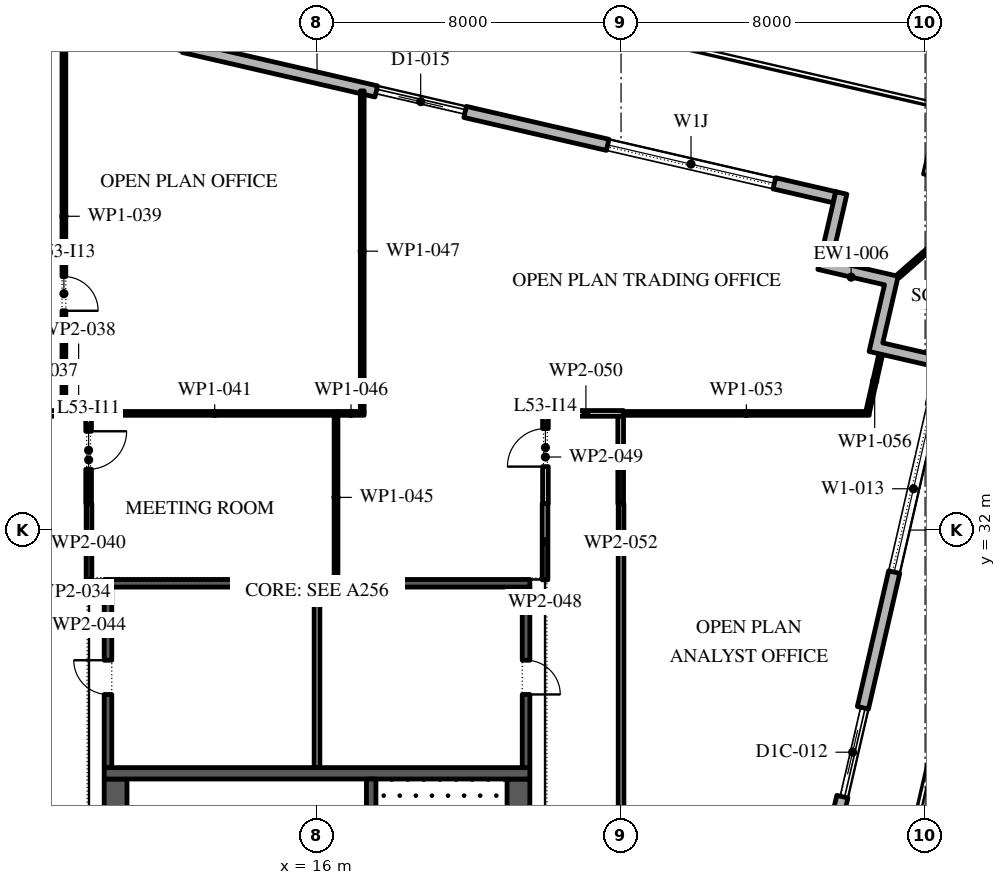
"""IFC4 building model, lengths in metres.
Left out: names, types, materials, properties, quantities, classifications, styles, units other than length and angle.
Written with IfcOpenShell. Run it as: python <this file> out.ifc"""

import sys

from ifc_helpers import new_model, si_unit, direction, frame, frame_2d, origin, place, context, subcontext, project, spatial, polyline, rectangle, outline, extrude, element, fill, save


model = new_model("IFC4")
c1 = context("Model", 3, precision=1e-05, world=origin(), true_north=direction((0.0, 1.0)))
c2 = subcontext(c1, "Body", "Model", "MODEL_VIEW")
j1 = project(units=[si_unit("LENGTHUNIT", "METRE"), si_unit("PLANEANGLEUNIT", "RADIAN")], contexts=[c1])
p1 = place(None, origin())
s1 = spatial("IfcSite", under=j1, at=p1, CompositionType="ELEMENT")
p2 = place(p1, origin())
s2 = spatial("IfcBuilding", under=s1, at=p2, CompositionType="ELEMENT")
p3 = place(p2, frame((0.0, 0.0, 247.2)))
s3 = spatial("IfcBuildingStorey", under=s2, at=p3, CompositionType="ELEMENT", Elevation=247.2)
p4 = place(p3, frame((21.359, -11.678, 0.0), z_axis=(0.0, 0.0, 1.0), x_axis=(0.224949198343, 0.974370493275, 0.0)))
e1 = element("IfcWall", 1, at=p4, inside=s3, PredefinedType="STANDARD", context=c2, shape_type="SweptSolid", body=[
    extrude(rectangle(XDim=49.5, YDim=0.3, at=frame_2d((24.75, 0.0))), origin(), (0.0, 0.0, 1.0), 4.0),
])
p5 = place(p4, frame((1.157, 0.0, 0.45)))
e2 = element("IfcOpeningElement", 2, at=p5, cuts=e1, PredefinedType="OPENING", context=c2, shape_type="SweptSolid", body=[
    extrude(rectangle(XDim=4.5, YDim=3.05, at=frame_2d((2.25, 1.525))), frame((0.0, 0.16, 0.0), z_axis=(0.0, -1.0, 0.0), x_axis=(1.0, 0.0, 0.0)), (0.0, 0.0, 1.0), 0.32),
])
p6 = place(p4, frame((8.121, 0.0, 0.45)))
e3 = element("IfcOpeningElement", 3, at=p6, cuts=e1, PredefinedType="OPENING", context=c2, shape_type="SweptSolid", body=[
    extrude(rectangle(XDim=4.5, YDim=3.05, at=frame_2d((2.25, 1.525))), frame((0.0, 0.16, 0.0), z_axis=(0.0, -1.0, 0.0), x_axis=(1.0, 0.0, 0.0)), (0.0, 0.0, 1.0), 0.32),
])
p7 = place(p4, frame((15.236, 0.0, 0.45)))
e4 = element("IfcOpeningElement", 4, at=p7, cuts=e1, PredefinedType="OPENING", context=c2, shape_type="SweptSolid", body=[
    extrude(rectangle(XDim=4.5, YDim=3.05, at=frame_2d((2.25, 1.525))), frame((0.0, 0.16, 0.0), z_axis=(0.0, -1.0, 0.0), x_axis=(1.0, 0.0, 0.0)), (0.0, 0.0, 1.0), 0.32),
])
p8 = place(p4, frame((22.35, 0.0, 0.45)))
e5 = element("IfcOpeningElement", 5, at=p8, cuts=e1, PredefinedType="OPENING", context=c2, shape_type="SweptSolid", body=[
    extrude(rectangle(XDim=4.5, YDim=3.05, at=frame_2d((2.25, 1.525))), frame((0.0, 0.16, 0.0), z_axis=(0.0, -1.0, 0.0), x_axis=(1.0, 0.0, 0.0)), (0.0, 0.0, 1.0), 0.32),
])
p9 = place(p4, frame((29.464, 0.0, 0.45)))
e6 = element("IfcOpeningElement", 6, at=p9, cuts=e1, PredefinedType="OPENING", context=c2, shape_type="SweptSolid", body=[
    extrude(rectangle(XDim=4.5, YDim=2.95, at=frame_2d((2.25, 1.475))), frame((0.0, 0.16, 0.0), z_axis=(0.0, -1.0, 0.0), x_axis=(1.0, 0.0, 0.0)), (0.0, 0.0, 1.0), 0.32),
])
p10 = place(p4, frame((37.628, 0.0, 0.0)))
e7 = element("IfcOpeningElement", 7, at=p10, cuts=e1, PredefinedType="OPENING", context=c2, shape_type="SweptSolid", body=[
    extrude(rectangle(XDim=2.4, YDim=3.325, at=frame_2d((1.2, 1.663))), frame((0.0, 0.16, 0.0), z_axis=(0.0, -1.0, 0.0), x_axis=(1.0, 0.0, 0.0)), (0.0, 0.0, 1.0), 0.32),
])
p11 = place(p4, frame((43.693, 0.0, 0.45)))
e8 = element("IfcOpeningElement", 8, at=p11, cuts=e1, PredefinedType="OPENING", context=c2, shape_type="SweptSolid", body=[
    extrude(rectangle(XDim=4.5, YDim=3.05, at=frame_2d((2.25, 1.525))), frame((0.0, 0.16, 0.0), z_axis=(0.0, -1.0, 0.0), x_axis=(1.0, 0.0, 0.0)), (0.0, 0.0, 1.0), 0.32),
])
p12 = place(p3, frame((29.616, 40.758, 0.0), z_axis=(0.0, 0.0, 1.0), x_axis=(-0.974370532314, 0.224949029246, 0.0)))
e9 = element("IfcWall", 9, at=p12, inside=s3, PredefinedType="STANDARD", context=c2, shape_type="SweptSolid", body=[
    extrude(rectangle(XDim=48.0, YDim=0.3, at=frame_2d((24.0, 0.0))), origin(), (0.0, 0.0, 1.0), 4.0),
])
p13 = place(p12, frame((1.625, 0.0, 0.45)))
e10 = element("IfcOpeningElement", 10, at=p13, cuts=e9, PredefinedType="OPENING", context=c2, shape_type="SweptSolid", body=[
    extrude(rectangle(XDim=4.5, YDim=2.675, at=frame_2d((2.25, 1.337))), frame((0.0, 0.16, 0.0), z_axis=(0.0, -1.0, 0.0), x_axis=(1.0, 0.0, 0.0)), (0.0, 0.0, 1.0), 0.32),
])
p14 = place(p12, frame((9.975, 0.0, 0.0)))
e11 = element("IfcOpeningElement", 11, at=p14, cuts=e9, PredefinedType="OPENING", context=c2, shape_type="SweptSolid", body=[
    extrude(rectangle(XDim=2.4, YDim=3.5, at=frame_2d((1.2, 1.75))), frame((0.0, 0.16, 0.0), z_axis=(0.0, -1.0, 0.0), x_axis=(1.0, 0.0, 0.0)), (0.0, 0.0, 1.0), 0.32),
])
p15 = place(p12, frame((17.575, 0.0, 0.45)))
e12 = element("IfcOpeningElement", 12, at=p15, cuts=e9, PredefinedType="OPENING", context=c2, shape_type="SweptSolid", body=[
    extrude(rectangle(XDim=4.5, YDim=2.525, at=frame_2d((2.25, 1.262))), frame((0.0, 0.16, 0.0), z_axis=(0.0, -1.0, 0.0), x_axis=(1.0, 0.0, 0.0)), (0.0, 0.0, 1.0), 0.32),
])
p16 = place(p12, frame((25.625, 0.0, 0.45)))
e13 = element("IfcOpeningElement", 13, at=p16, cuts=e9, PredefinedType="OPENING", context=c2, shape_type="SweptSolid", body=[
    extrude(rectangle(XDim=4.5, YDim=2.45, at=frame_2d((2.25, 1.225))), frame((0.0, 0.16, 0.0), z_axis=(0.0, -1.0, 0.0), x_axis=(1.0, 0.0, 0.0)), (0.0, 0.0, 1.0), 0.32),
])
p17 = place(p12, frame((33.675, 0.0, 0.45)))
e14 = element("IfcOpeningElement", 14, at=p17, cuts=e9, PredefinedType="OPENING", context=c2, shape_type="SweptSolid", body=[
    extrude(rectangle(XDim=4.5, YDim=2.45, at=frame_2d((2.25, 1.225))), frame((0.0, 0.16, 0.0), z_axis=(0.0, -1.0, 0.0), x_axis=(1.0, 0.0, 0.0)), (0.0, 0.0, 1.0), 0.32),
])
p18 = place(p12, frame((42.775, 0.0, 0.0)))
e15 = element("IfcOpeningElement", 15, at=p18, cuts=e9, PredefinedType="OPENING", context=c2, shape_type="SweptSolid", body=[
    extrude(rectangle(XDim=2.4, YDim=3.5, at=frame_2d((1.2, 1.75))), frame((0.0, 0.16, 0.0), z_axis=(0.0, -1.0, 0.0), x_axis=(1.0, 0.0, 0.0)), (0.0, 0.0, 1.0), 0.32),
])
p19 = place(p3, origin())
e16 = element("IfcWall", 16, at=p19, inside=s3, PredefinedType="STANDARD", context=c2, shape_type="SweptSolid", body=[
    extrude(outline(polyline([(30.931, 38.453), (29.177, 38.858), (29.65, 40.905), (29.942, 40.837), (29.537, 39.083), (31.291, 38.678), (30.886, 36.924), (32.348, 36.587), (32.28, 36.295), (30.526, 36.699), (30.931, 38.453)])), origin(), (0.0, 0.0, 1.0), 4.0),
])
p20 = place(p3, frame((31.291, 38.678, -0.05), z_axis=(0.0, 0.0, 1.0), x_axis=(0.752462268259, 0.658635358029, 0.0)))
e17 = element("IfcWall", 17, at=p20, inside=s3, PredefinedType="STANDARD", context=c2, shape_type="SweptSolid", body=[
    extrude(rectangle(XDim=3.305, YDim=0.1, at=frame_2d((1.652, 0.0))), origin(), (0.0, 0.0, 1.0), 4.05),
])
p21 = place(p3, frame((21.3, -2.45, 0.0), z_axis=(0.0, 0.0, 1.0), x_axis=(0.0, 1.0, 0.0)))
e18 = element("IfcWall", 18, at=p21, inside=s3, PredefinedType="SHEAR", context=c2, shape_type="SweptSolid", body=[
    extrude(rectangle(XDim=27.9, YDim=0.6, at=frame_2d((13.95, 0.0))), origin(), (0.0, 0.0, 1.0), 4.0),
])
p22 = place(p21, frame((5.05, 0.0, 0.0)))
e19 = element("IfcOpeningElement", 19, at=p22, cuts=e18, PredefinedType="OPENING", context=c2, shape_type="SweptSolid", body=[
    extrude(rectangle(XDim=1.2, YDim=2.1, at=frame_2d((0.6, 1.05))), frame((0.0, 0.31, 0.0), z_axis=(0.0, -1.0, 0.0), x_axis=(1.0, 0.0, 0.0)), (0.0, 0.0, 1.0), 0.62),
])
p23 = place(p21, frame((21.65, 0.0, 0.0)))
e20 = element("IfcOpeningElement", 20, at=p23, cuts=e18, PredefinedType="OPENING", context=c2, shape_type="SweptSolid", body=[
    extrude(rectangle(XDim=1.2, YDim=2.1, at=frame_2d((0.6, 1.05))), frame((0.0, 0.31, 0.0), z_axis=(0.0, -1.0, 0.0), x_axis=(1.0, 0.0, 0.0)), (0.0, 0.0, 1.0), 0.62),
])
p24 = place(p3, frame((10.7, -2.45, 0.0), z_axis=(0.0, 0.0, 1.0), x_axis=(0.0, 1.0, 0.0)))
e21 = element("IfcWall", 21, at=p24, inside=s3, PredefinedType="SHEAR", context=c2, shape_type="SweptSolid", body=[
    extrude(rectangle(XDim=27.9, YDim=0.6, at=frame_2d((13.95, 0.0))), origin(), (0.0, 0.0, 1.0), 4.0),
])
p25 = place(p24, frame((23.65, 0.0, 0.0)))
e22 = element("IfcOpeningElement", 22, at=p25, cuts=e21, PredefinedType="OPENING", context=c2, shape_type="SweptSolid", body=[
    extrude(rectangle(XDim=2.4, YDim=2.1, at=frame_2d((1.2, 1.05))), frame((0.0, 0.31, 0.0), z_axis=(0.0, -1.0, 0.0), x_axis=(1.0, 0.0, 0.0)), (0.0, 0.0, 1.0), 0.62),
])
p26 = place(p24, frame((1.087, 0.0, 0.0)))
e23 = element("IfcOpeningElement", 23, at=p26, cuts=e21, PredefinedType="OPENING", context=c2, shape_type="SweptSolid", body=[
    extrude(rectangle(XDim=0.9, YDim=2.1, at=frame_2d((0.45, 1.05))), frame((0.0, 0.31, 0.0), z_axis=(0.0, -1.0, 0.0), x_axis=(1.0, 0.0, 0.0)), (0.0, 0.0, 1.0), 0.62),
])
p27 = place(p24, frame((4.262, 0.0, 0.0)))
e24 = element("IfcOpeningElement", 24, at=p27, cuts=e21, PredefinedType="OPENING", context=c2, shape_type="SweptSolid", body=[
    extrude(rectangle(XDim=1.0, YDim=2.1, at=frame_2d((0.5, 1.05))), frame((0.0, 0.31, 0.0), z_axis=(0.0, -1.0, 0.0), x_axis=(1.0, 0.0, 0.0)), (0.0, 0.0, 1.0), 0.62),
])
p28 = place(p3, frame((10.4, 25.6, 0.0), z_axis=(0.0, 0.0, 1.0), x_axis=(1.0, 0.0, 0.0)))
e25 = element("IfcWall", 25, at=p28, inside=s3, PredefinedType="SHEAR", context=c2, shape_type="SweptSolid", body=[
    extrude(rectangle(XDim=11.2, YDim=0.3, at=frame_2d((5.6, 0.0))), origin(), (0.0, 0.0, 1.0), 4.0),
])
p29 = place(p3, frame((17.425, 19.15, 0.0), z_axis=(0.0, 0.0, 1.0), x_axis=(0.0, 1.0, 0.0)))
e26 = element("IfcWall", 26, at=p29, inside=s3, PredefinedType="SHEAR", context=c2, shape_type="SweptSolid", body=[
    extrude(rectangle(XDim=6.3, YDim=0.25, at=frame_2d((3.15, 0.0))), origin(), (0.0, 0.0, 1.0), 4.0),
])
p30 = place(p29, frame((0.05, 0.0, 0.0)))
e27 = element("IfcOpeningElement", 27, at=p30, cuts=e26, PredefinedType="OPENING", context=c2, shape_type="SweptSolid", body=[
    extrude(rectangle(XDim=1.2, YDim=2.1, at=frame_2d((0.6, 1.05))), frame((0.0, 0.135, 0.0), z_axis=(0.0, -1.0, 0.0), x_axis=(1.0, 0.0, 0.0)), (0.0, 0.0, 1.0), 0.27),
])
p31 = place(p3, frame((21.5, 25.75, 0.0), z_axis=(0.0, 0.0, 1.0), x_axis=(0.0, 1.0, 0.0)))
e28 = element("IfcWall", 28, at=p31, inside=s3, PredefinedType="SHEAR", context=c2, shape_type="SweptSolid", body=[
    extrude(rectangle(XDim=4.75, YDim=0.2, at=frame_2d((2.375, 0.0))), origin(), (0.0, 0.0, 1.0), 4.0),
])
p32 = place(p31, frame((1.925, 0.0, 0.0)))
e29 = element("IfcOpeningElement", 29, at=p32, cuts=e28, PredefinedType="OPENING", context=c2, shape_type="SweptSolid", body=[
    extrude(rectangle(XDim=0.9, YDim=2.1, at=frame_2d((0.45, 1.05))), frame((0.0, 0.11, 0.0), z_axis=(0.0, -1.0, 0.0), x_axis=(1.0, 0.0, 0.0)), (0.0, 0.0, 1.0), 0.22),
])
p33 = place(p3, frame((10.5, 25.75, 0.0), z_axis=(0.0, 0.0, 1.0), x_axis=(0.0, 1.0, 0.0)))
e30 = element("IfcWall", 30, at=p33, inside=s3, PredefinedType="SHEAR", context=c2, shape_type="SweptSolid", body=[
    extrude(rectangle(XDim=4.75, YDim=0.2, at=frame_2d((2.375, 0.0))), origin(), (0.0, 0.0, 1.0), 4.0),
])
p34 = place(p33, frame((1.925, 0.0, 0.0)))
e31 = element("IfcOpeningElement", 31, at=p34, cuts=e30, PredefinedType="OPENING", context=c2, shape_type="SweptSolid", body=[
    extrude(rectangle(XDim=0.9, YDim=2.1, at=frame_2d((0.45, 1.05))), frame((0.0, 0.11, 0.0), z_axis=(0.0, -1.0, 0.0), x_axis=(1.0, 0.0, 0.0)), (0.0, 0.0, 1.0), 0.22),
])
p35 = place(p3, frame((10.4, 30.6, 0.0), z_axis=(0.0, 0.0, 1.0), x_axis=(1.0, 0.0, 0.0)))
e32 = element("IfcWall", 32, at=p35, inside=s3, PredefinedType="SHEAR", context=c2, shape_type="SweptSolid", body=[
    extrude(rectangle(XDim=11.2, YDim=0.2, at=frame_2d((5.6, 0.0))), origin(), (0.0, 0.0, 1.0), 4.0),
])
p36 = place(p3, frame((16.0, 25.75, 0.0), z_axis=(0.0, 0.0, 1.0), x_axis=(0.0, 1.0, 0.0)))
e33 = element("IfcWall", 33, at=p36, inside=s3, PredefinedType="PARTITIONING", context=c2, shape_type="SweptSolid", body=[
    extrude(rectangle(XDim=4.75, YDim=0.15, at=frame_2d((2.375, 0.0))), origin(), (0.0, 0.0, 1.0), 4.0),
])
p37 = place(p3, frame((8.085, 35.07, 0.0), z_axis=(0.0, 0.0, 1.0), x_axis=(1.0, 0.0, 0.0)))
e34 = element("IfcWall", 34, at=p37, inside=s3, PredefinedType="PARTITIONING", context=c2, shape_type="SweptSolid", body=[
    extrude(rectangle(XDim=1.305, YDim=0.15, at=frame_2d((0.652, 0.0))), origin(), (0.0, 0.0, 1.0), 4.0),
])
p38 = place(p3, frame((9.39, 35.07, 0.0), z_axis=(0.0, 0.0, 1.0), x_axis=(1.0, 0.0, 0.0)))
e35 = element("IfcWall", 35, at=p38, inside=s3, PredefinedType="PARTITIONING", context=c2, shape_type="SweptSolid", body=[
    extrude(rectangle(XDim=0.675, YDim=0.15, at=frame_2d((0.337, 0.0))), origin(), (0.0, 0.0, 1.0), 4.0),
])
p39 = place(p3, frame((9.34, 45.368, 0.0), z_axis=(0.0, 0.0, 1.0), x_axis=(0.0, -1.0, 0.0)))
e36 = element("IfcWall", 36, at=p39, inside=s3, PredefinedType="PARTITIONING", context=c2, shape_type="SweptSolid", body=[
    extrude(rectangle(XDim=10.223, YDim=0.1, at=frame_2d((5.111, 0.0))), origin(), (0.0, 0.0, 1.0), 4.0),
])
p40 = place(p39, frame((6.698, 0.0, 0.0)))
e37 = element("IfcOpeningElement", 37, at=p40, cuts=e36, PredefinedType="OPENING", context=c2, shape_type="SweptSolid", body=[
    extrude(rectangle(XDim=0.9, YDim=2.1, at=frame_2d((0.45, 1.05))), frame((0.0, 0.06, 0.0), z_axis=(0.0, -1.0, 0.0), x_axis=(1.0, 0.0, 0.0)), (0.0, 0.0, 1.0), 0.12),
])
p41 = place(p3, frame((9.99, 34.995, 0.0), z_axis=(0.0, 0.0, 1.0), x_axis=(0.0, -1.0, 0.0)))
e38 = element("IfcWall", 38, at=p41, inside=s3, PredefinedType="PARTITIONING", context=c2, shape_type="SweptSolid", body=[
    extrude(rectangle(XDim=2.295, YDim=0.15, at=frame_2d((1.147, 0.0))), origin(), (0.0, 0.0, 1.0), 4.0),
])
p42 = place(p41, frame((0.395, 0.0, 0.0)))
e39 = element("IfcOpeningElement", 39, at=p42, cuts=e38, PredefinedType="OPENING", context=c2, shape_type="SweptSolid", body=[
    extrude(rectangle(XDim=1.0, YDim=2.1, at=frame_2d((0.5, 1.05))), frame((0.0, 0.085, 0.0), z_axis=(0.0, -1.0, 0.0), x_axis=(1.0, 0.0, 0.0)), (0.0, 0.0, 1.0), 0.17),
])
p43 = place(p3, frame((10.065, 35.07, 0.0), z_axis=(0.0, 0.0, 1.0), x_axis=(1.0, 0.0, 0.0)))
e40 = element("IfcWall", 40, at=p43, inside=s3, PredefinedType="PARTITIONING", context=c2, shape_type="SweptSolid", body=[
    extrude(rectangle(XDim=6.485, YDim=0.1, at=frame_2d((3.243, 0.0))), origin(), (0.0, 0.0, 1.0), 4.0),
])
p44 = place(p3, frame((10.0, 32.7, 0.0), z_axis=(0.0, 0.0, 1.0), x_axis=(0.0, -1.0, 0.0)))
e41 = element("IfcWall", 41, at=p44, inside=s3, PredefinedType="PARTITIONING", context=c2, shape_type="SweptSolid", body=[
    extrude(rectangle(XDim=2.0, YDim=0.15, at=frame_2d((1.0, 0.0))), origin(), (0.0, 0.0, 1.0), 4.0),
])
p45 = place(p3, frame((16.5, 35.02, 0.0), z_axis=(0.0, 0.0, 1.0), x_axis=(0.0, -1.0, 0.0)))
e42 = element("IfcWall", 42, at=p45, inside=s3, PredefinedType="PARTITIONING", context=c2, shape_type="SweptSolid", body=[
    extrude(rectangle(XDim=4.32, YDim=0.1, at=frame_2d((2.16, 0.0))), origin(), (0.0, 0.0, 1.0), 4.0),
])
p46 = place(p3, frame((17.24, 35.07, 0.0), z_axis=(0.0, 0.0, 1.0), x_axis=(-1.0, 0.0, 0.0)))
e43 = element("IfcWall", 43, at=p46, inside=s3, PredefinedType="PARTITIONING", context=c2, shape_type="SweptSolid", body=[
    extrude(rectangle(XDim=0.69, YDim=0.1, at=frame_2d((0.345, 0.0))), origin(), (0.0, 0.0, 1.0), 4.0),
])
p47 = place(p3, frame((17.19, 43.556, 0.0), z_axis=(0.0, 0.0, 1.0), x_axis=(0.0, -1.0, 0.0)))
e44 = element("IfcWall", 44, at=p47, inside=s3, PredefinedType="PARTITIONING", context=c2, shape_type="SweptSolid", body=[
    extrude(rectangle(XDim=8.436, YDim=0.1, at=frame_2d((4.218, 0.0))), origin(), (0.0, 0.0, 1.0), 4.0),
])
p48 = place(p3, frame((22.0, 30.69, 0.0), z_axis=(0.0, 0.0, 1.0), x_axis=(0.0, 1.0, 0.0)))
e45 = element("IfcWall", 45, at=p48, inside=s3, PredefinedType="PARTITIONING", context=c2, shape_type="SweptSolid", body=[
    extrude(rectangle(XDim=2.01, YDim=0.15, at=frame_2d((1.005, 0.0))), origin(), (0.0, 0.0, 1.0), 4.0),
])
p49 = place(p3, frame((22.01, 32.7, 0.0), z_axis=(0.0, 0.0, 1.0), x_axis=(0.0, 1.0, 0.0)))
e46 = element("IfcWall", 46, at=p49, inside=s3, PredefinedType="PARTITIONING", context=c2, shape_type="SweptSolid", body=[
    extrude(rectangle(XDim=2.445, YDim=0.15, at=frame_2d((1.223, 0.0))), origin(), (0.0, 0.0, 1.0), 4.0),
])
p50 = place(p49, frame((0.97, 0.0, 0.0)))
e47 = element("IfcOpeningElement", 47, at=p50, cuts=e46, PredefinedType="OPENING", context=c2, shape_type="SweptSolid", body=[
    extrude(rectangle(XDim=1.0, YDim=2.1, at=frame_2d((0.5, 1.05))), frame((0.0, 0.085, 0.0), z_axis=(0.0, -1.0, 0.0), x_axis=(1.0, 0.0, 0.0)), (0.0, 0.0, 1.0), 0.17),
])
p51 = place(p3, frame((22.085, 35.07, 0.0), z_axis=(0.0, 0.0, 1.0), x_axis=(1.0, 0.0, 0.0)))
e48 = element("IfcWall", 48, at=p51, inside=s3, PredefinedType="PARTITIONING", context=c2, shape_type="SweptSolid", body=[
    extrude(rectangle(XDim=1.98, YDim=0.15, at=frame_2d((0.99, 0.0))), origin(), (0.0, 0.0, 1.0), 4.0),
])
p52 = place(p3, frame((23.99, 34.995, 0.0), z_axis=(0.0, 0.0, 1.0), x_axis=(0.0, -1.0, 0.0)))
e49 = element("IfcWall", 49, at=p52, inside=s3, PredefinedType="PARTITIONING", context=c2, shape_type="SweptSolid", body=[
    extrude(rectangle(XDim=2.295, YDim=0.15, at=frame_2d((1.147, 0.0))), origin(), (0.0, 0.0, 1.0), 4.0),
])
p53 = place(p3, frame((24.065, 35.07, 0.0), z_axis=(0.0, 0.0, 1.0), x_axis=(1.0, 0.0, 0.0)))
e50 = element("IfcWall", 50, at=p53, inside=s3, PredefinedType="PARTITIONING", context=c2, shape_type="SweptSolid", body=[
    extrude(rectangle(XDim=6.465, YDim=0.1, at=frame_2d((3.232, 0.0))), origin(), (0.0, 0.0, 1.0), 4.0),
])
p54 = place(p3, frame((24.0, 32.7, 0.0), z_axis=(0.0, 0.0, 1.0), x_axis=(0.0, -1.0, 0.0)))
e51 = element("IfcWall", 51, at=p54, inside=s3, PredefinedType="PARTITIONING", context=c2, shape_type="SweptSolid", body=[
    extrude(rectangle(XDim=28.905, YDim=0.15, at=frame_2d((14.453, 0.0))), origin(), (0.0, 0.0, 1.0), 4.0),
])
p55 = place(p54, frame((19.83, 0.0, 0.0)))
e52 = element("IfcOpeningElement", 52, at=p55, cuts=e51, PredefinedType="OPENING", context=c2, shape_type="SweptSolid", body=[
    extrude(rectangle(XDim=1.0, YDim=2.1, at=frame_2d((0.5, 1.05))), frame((0.0, 0.085, 0.0), z_axis=(0.0, -1.0, 0.0), x_axis=(1.0, 0.0, 0.0)), (0.0, 0.0, 1.0), 0.17),
])
p56 = place(p3, frame((30.491, 35.119, 0.0), z_axis=(0.0, 0.0, 1.0), x_axis=(0.221461033886, 0.975169221453, 0.0)))
e53 = element("IfcWall", 53, at=p56, inside=s3, PredefinedType="PARTITIONING", context=c2, shape_type="SweptSolid", body=[
    extrude(rectangle(XDim=1.648, YDim=0.1, at=frame_2d((0.824, 0.0))), origin(), (0.0, 0.0, 1.0), 4.0),
])
p57 = place(p10, origin())
e54 = element("IfcDoor", 54, at=p57, inside=s3, OperationType="DOUBLE_DOOR_SLIDING", PredefinedType="DOOR", context=c2, shape_type="SweptSolid", body=[
    extrude(rectangle(XDim=2.4, YDim=3.325, at=frame_2d((1.2, 1.663))), frame((0.0, 0.025, 0.0), z_axis=(0.0, -1.0, 0.0), x_axis=(1.0, 0.0, 0.0)), (0.0, 0.0, 1.0), 0.05),
])
fill(e7, e54)
p58 = place(p11, origin())
e55 = element("IfcWindow", 55, at=p58, inside=s3, PartitioningType="DOUBLE_PANEL_VERTICAL", PredefinedType="WINDOW", context=c2, shape_type="SweptSolid", body=[
    extrude(rectangle(XDim=4.5, YDim=3.05, at=frame_2d((2.25, 1.525))), frame((0.0, 0.03, 0.0), z_axis=(0.0, -1.0, 0.0), x_axis=(1.0, 0.0, 0.0)), (0.0, 0.0, 1.0), 0.06),
])
fill(e8, e55)
p59 = place(p13, origin())
e56 = element("IfcWindow", 56, at=p59, inside=s3, PartitioningType="DOUBLE_PANEL_VERTICAL", PredefinedType="WINDOW", context=c2, shape_type="SweptSolid", body=[
    extrude(rectangle(XDim=4.5, YDim=2.675, at=frame_2d((2.25, 1.337))), frame((0.0, 0.03, 0.0), z_axis=(0.0, -1.0, 0.0), x_axis=(1.0, 0.0, 0.0)), (0.0, 0.0, 1.0), 0.06),
])
fill(e10, e56)
p60 = place(p14, origin())
e57 = element("IfcDoor", 57, at=p60, inside=s3, OperationType="DOUBLE_DOOR_SLIDING", PredefinedType="DOOR", context=c2, shape_type="SweptSolid", body=[
    extrude(rectangle(XDim=2.4, YDim=3.5, at=frame_2d((1.2, 1.75))), frame((0.0, 0.025, 0.0), z_axis=(0.0, -1.0, 0.0), x_axis=(1.0, 0.0, 0.0)), (0.0, 0.0, 1.0), 0.05),
])
fill(e11, e57)
p61 = place(p32, frame((0.9, 0.15, 0.0), z_axis=(0.0, 0.0, 1.0), x_axis=(-1.0, 0.0, 0.0)))
e58 = element("IfcDoor", 58, at=p61, inside=s3, OperationType="SINGLE_SWING_LEFT", PredefinedType="DOOR", context=c2, shape_type="SweptSolid", body=[
    extrude(rectangle(XDim=0.9, YDim=2.1, at=frame_2d((0.45, 1.05))), frame((0.0, 0.1, 0.0), z_axis=(0.0, -1.0, 0.0), x_axis=(1.0, 0.0, 0.0)), (0.0, 0.0, 1.0), 0.05),
])
fill(e29, e58)
p62 = place(p34, origin())
e59 = element("IfcDoor", 59, at=p62, inside=s3, OperationType="SINGLE_SWING_LEFT", PredefinedType="DOOR", context=c2, shape_type="SweptSolid", body=[
    extrude(rectangle(XDim=0.9, YDim=2.1, at=frame_2d((0.45, 1.05))), frame((0.0, -0.05, 0.0), z_axis=(0.0, -1.0, 0.0), x_axis=(1.0, 0.0, 0.0)), (0.0, 0.0, 1.0), 0.05),
])
fill(e31, e59)
p63 = place(p42, origin())
e60 = element("IfcDoor", 60, at=p63, inside=s3, OperationType="SINGLE_SWING_RIGHT", PredefinedType="DOOR", context=c2, shape_type="SweptSolid", body=[
    extrude(rectangle(XDim=1.0, YDim=2.1, at=frame_2d((0.5, 1.05))), frame((0.0, 0.025, 0.0), z_axis=(0.0, -1.0, 0.0), x_axis=(1.0, 0.0, 0.0)), (0.0, 0.0, 1.0), 0.05),
])
fill(e39, e60)
p64 = place(p40, origin())
e61 = element("IfcDoor", 61, at=p64, inside=s3, OperationType="SINGLE_SWING_LEFT", PredefinedType="DOOR", context=c2, shape_type="SweptSolid", body=[
    extrude(rectangle(XDim=0.9, YDim=2.1, at=frame_2d((0.45, 1.05))), frame((0.0, 0.025, 0.0), z_axis=(0.0, -1.0, 0.0), x_axis=(1.0, 0.0, 0.0)), (0.0, 0.0, 1.0), 0.05),
])
fill(e37, e61)
p65 = place(p50, origin())
e62 = element("IfcDoor", 62, at=p65, inside=s3, OperationType="SINGLE_SWING_RIGHT", PredefinedType="DOOR", context=c2, shape_type="SweptSolid", body=[
    extrude(rectangle(XDim=1.0, YDim=2.1, at=frame_2d((0.5, 1.05))), frame((0.0, 0.025, 0.0), z_axis=(0.0, -1.0, 0.0), x_axis=(1.0, 0.0, 0.0)), (0.0, 0.0, 1.0), 0.05),
])
fill(e47, e62)
save(model, sys.argv[1])
